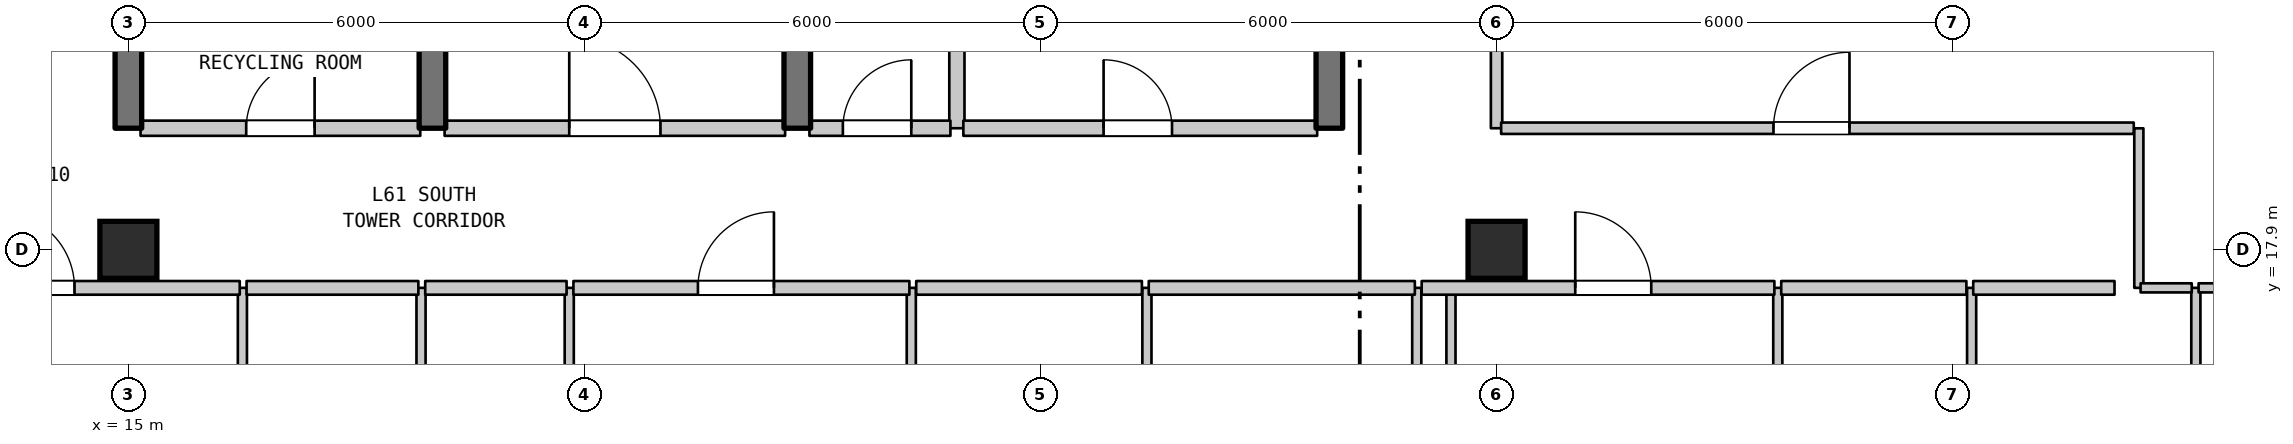
"""IFC4 building model, lengths in metres.
Left out: names, types, materials, properties, quantities, classifications, styles, units other than length and angle.
Written with IfcOpenShell. Run it as: python <this file> out.ifc"""

import sys

from ifc_helpers import new_model, si_unit, direction, frame, frame_2d, origin, origin_2d, place, context, subcontext, project, spatial, rectangle, extrude, element, fill, save


model = new_model("IFC4")
c1 = context("Model", 3, precision=1e-05, world=origin(), true_north=direction((0.0, 1.0)))
c2 = subcontext(c1, "Body", "Model", "MODEL_VIEW")
j1 = project(units=[si_unit("LENGTHUNIT", "METRE"), si_unit("PLANEANGLEUNIT", "RADIAN")], contexts=[c1])
p1 = place(None, origin())
s1 = spatial("IfcSite", under=j1, at=p1, CompositionType="ELEMENT")
p2 = place(p1, origin())
s2 = spatial("IfcBuilding", under=s1, at=p2, CompositionType="ELEMENT")
p3 = place(p2, frame((0.0, 0.0, 247.3)))
s3 = spatial("IfcBuildingStorey", under=s2, at=p3, CompositionType="ELEMENT", Elevation=247.3)
for number, where, z_axis, x_axis in (
    (1, (15.0, 17.9, 0.0), (0.0, 0.0, 1.0), (1.0, 0.0, 0.0)),
    (2, (33.0, 17.9, 0.0), (0.0, 0.0, 1.0), (1.0, 0.0, 0.0)),
):
    element("IfcColumn", number, at=place(p3, frame(where, z_axis=z_axis, x_axis=x_axis)), inside=s3, PredefinedType="COLUMN", context=c2, shape_type="SweptSolid", body=[
        extrude(rectangle(XDim=0.75, YDim=0.75, at=origin_2d()), origin(), (0.0, 0.0, 1.0), 3.7),
    ])
p4 = place(p3, frame((15.0, 19.5, 0.0), z_axis=(0.0, 0.0, 1.0), x_axis=(0.0, 1.0, 0.0)))
e3 = element("IfcWall", 3, at=p4, inside=s3, PredefinedType="SHEAR", context=c2, shape_type="SweptSolid", body=[
    extrude(rectangle(XDim=3.2, YDim=0.35, at=frame_2d((1.6, 0.0))), origin(), (0.0, 0.0, 1.0), 3.39),
])
p5 = place(p3, frame((16.5, 14.2, 0.0), z_axis=(0.0, 0.0, 1.0), x_axis=(0.0, 1.0, 0.0)))
e4 = element("IfcWall", 4, at=p5, inside=s3, PredefinedType="PARTITIONING", context=c2, shape_type="SweptSolid", body=[
    extrude(rectangle(XDim=3.2, YDim=0.12, at=frame_2d((1.6, 0.0))), origin(), (0.0, 0.0, 1.0), 3.39),
])
p6 = place(p5, frame((1.15, 0.0, 0.0)))
e5 = element("IfcOpeningElement", 5, at=p6, cuts=e4, PredefinedType="OPENING", context=c2, shape_type="SweptSolid", body=[
    extrude(rectangle(XDim=0.9, YDim=2.15, at=frame_2d((0.45, 1.075))), frame((0.0, 0.07, 0.0), z_axis=(0.0, -1.0, 0.0), x_axis=(1.0, 0.0, 0.0)), (0.0, 0.0, 1.0), 0.14),
])
p7 = place(p3, frame((18.85, 14.2, 0.0), z_axis=(0.0, 0.0, 1.0), x_axis=(0.0, 1.0, 0.0)))
e6 = element("IfcWall", 6, at=p7, inside=s3, PredefinedType="PARTITIONING", context=c2, shape_type="SweptSolid", body=[
    extrude(rectangle(XDim=3.2, YDim=0.12, at=frame_2d((1.6, 0.0))), origin(), (0.0, 0.0, 1.0), 3.39),
])
p8 = place(p3, frame((19.0, 19.5, 0.0), z_axis=(0.0, 0.0, 1.0), x_axis=(0.0, 1.0, 0.0)))
e7 = element("IfcWall", 7, at=p8, inside=s3, PredefinedType="SHEAR", context=c2, shape_type="SweptSolid", body=[
    extrude(rectangle(XDim=3.2, YDim=0.35, at=frame_2d((1.6, 0.0))), origin(), (0.0, 0.0, 1.0), 3.39),
])
p9 = place(p3, frame((20.8, 7.075, 0.0), z_axis=(0.0, 0.0, 1.0), x_axis=(0.0, 1.0, 0.0)))
e8 = element("IfcWall", 8, at=p9, inside=s3, PredefinedType="PARTITIONING", context=c2, shape_type="SweptSolid", body=[
    extrude(rectangle(XDim=10.325, YDim=0.12, at=frame_2d((5.163, 0.0))), origin(), (0.0, 0.0, 1.0), 3.39),
])
p10 = place(p3, frame((23.8, 19.5, 0.0), z_axis=(0.0, 0.0, 1.0), x_axis=(0.0, 1.0, 0.0)))
e9 = element("IfcWall", 9, at=p10, inside=s3, PredefinedType="SHEAR", context=c2, shape_type="SweptSolid", body=[
    extrude(rectangle(XDim=6.6, YDim=0.35, at=frame_2d((3.3, 0.0))), origin(), (0.0, 0.0, 1.0), 3.39),
])
p11 = place(p10, frame((4.304, 0.0, 0.0)))
e10 = element("IfcOpeningElement", 10, at=p11, cuts=e9, PredefinedType="OPENING", context=c2, shape_type="SweptSolid", body=[
    extrude(rectangle(XDim=0.9, YDim=2.15, at=frame_2d((0.45, 1.075))), frame((0.0, 0.185, 0.0), z_axis=(0.0, -1.0, 0.0), x_axis=(1.0, 0.0, 0.0)), (0.0, 0.0, 1.0), 0.37),
])
p12 = place(p3, frame((25.3, 13.62, 0.0), z_axis=(0.0, 0.0, 1.0), x_axis=(0.0, 1.0, 0.0)))
e11 = element("IfcWall", 11, at=p12, inside=s3, PredefinedType="PARTITIONING", context=c2, shape_type="SweptSolid", body=[
    extrude(rectangle(XDim=3.78, YDim=0.12, at=frame_2d((1.89, 0.0))), origin(), (0.0, 0.0, 1.0), 3.39),
])
p13 = place(p3, frame((25.9, 19.5, 0.0), z_axis=(0.0, 0.0, 1.0), x_axis=(0.0, 1.0, 0.0)))
e12 = element("IfcWall", 12, at=p13, inside=s3, PredefinedType="STANDARD", context=c2, shape_type="SweptSolid", body=[
    extrude(rectangle(XDim=3.2, YDim=0.2, at=frame_2d((1.6, 0.0))), origin(), (0.0, 0.0, 1.0), 3.39),
])
p14 = place(p3, frame((28.4, 13.62, 0.0), z_axis=(0.0, 0.0, 1.0), x_axis=(0.0, 1.0, 0.0)))
e13 = element("IfcWall", 13, at=p14, inside=s3, PredefinedType="PARTITIONING", context=c2, shape_type="SweptSolid", body=[
    extrude(rectangle(XDim=3.78, YDim=0.12, at=frame_2d((1.89, 0.0))), origin(), (0.0, 0.0, 1.0), 3.39),
])
p15 = place(p3, frame((30.8, 19.5, 0.0), z_axis=(0.0, 0.0, 1.0), x_axis=(0.0, 1.0, 0.0)))
e14 = element("IfcWall", 14, at=p15, inside=s3, PredefinedType="SHEAR", context=c2, shape_type="SweptSolid", body=[
    extrude(rectangle(XDim=3.2, YDim=0.35, at=frame_2d((1.6, 0.0))), origin(), (0.0, 0.0, 1.0), 3.39),
])
p16 = place(p3, frame((31.95, 13.62, 0.0), z_axis=(0.0, 0.0, 1.0), x_axis=(0.0, 1.0, 0.0)))
e15 = element("IfcWall", 15, at=p16, inside=s3, PredefinedType="PARTITIONING", context=c2, shape_type="SweptSolid", body=[
    extrude(rectangle(XDim=3.78, YDim=0.12, at=frame_2d((1.89, 0.0))), origin(), (0.0, 0.0, 1.0), 3.39),
])
p17 = place(p3, frame((32.4, 6.71, 0.0), z_axis=(0.0, 0.0, 1.0), x_axis=(0.0, 1.0, 0.0)))
e16 = element("IfcWall", 16, at=p17, inside=s3, PredefinedType="PARTITIONING", context=c2, shape_type="SweptSolid", body=[
    extrude(rectangle(XDim=10.69, YDim=0.12, at=frame_2d((5.345, 0.0))), origin(), (0.0, 0.0, 1.0), 3.39),
])
p18 = place(p3, frame((33.0, 19.5, 0.0), z_axis=(0.0, 0.0, 1.0), x_axis=(0.0, 1.0, 0.0)))
e17 = element("IfcWall", 17, at=p18, inside=s3, PredefinedType="STANDARD", context=c2, shape_type="SweptSolid", body=[
    extrude(rectangle(XDim=8.4, YDim=0.15, at=frame_2d((4.2, 0.0))), origin(), (0.0, 0.0, 1.0), 3.1),
])
for number, where, z_axis, x_axis in (
    (18, (36.7, 13.62, 0.0), (0.0, 0.0, 1.0), (0.0, 1.0, 0.0)),
    (19, (39.25, 13.62, 0.0), (0.0, 0.0, 1.0), (0.0, 1.0, 0.0)),
):
    element("IfcWall", number, at=place(p3, frame(where, z_axis=z_axis, x_axis=x_axis)), inside=s3, PredefinedType="PARTITIONING", context=c2, shape_type="SweptSolid", body=[
        extrude(rectangle(XDim=3.78, YDim=0.12, at=frame_2d((1.89, 0.0))), origin(), (0.0, 0.0, 1.0), 3.39),
    ])
p19 = place(p3, frame((41.45, 17.4, 0.0), z_axis=(0.0, 0.0, 1.0), x_axis=(0.0, 1.0, 0.0)))
e20 = element("IfcWall", 20, at=p19, inside=s3, PredefinedType="PARTITIONING", context=c2, shape_type="SweptSolid", body=[
    extrude(rectangle(XDim=2.099, YDim=0.12, at=frame_2d((1.05, 0.0))), origin(), (0.0, 0.0, 1.0), 3.39),
])
p20 = place(p3, frame((42.2, 13.62, 0.0), z_axis=(0.0, 0.0, 1.0), x_axis=(0.0, 1.0, 0.0)))
e21 = element("IfcWall", 21, at=p20, inside=s3, PredefinedType="PARTITIONING", context=c2, shape_type="SweptSolid", body=[
    extrude(rectangle(XDim=3.78, YDim=0.12, at=frame_2d((1.89, 0.0))), origin(), (0.0, 0.0, 1.0), 3.39),
])
p21 = place(p3, frame((12.975, 17.4, 0.0), z_axis=(0.0, 0.0, 1.0), x_axis=(1.0, 0.0, 0.0)))
e22 = element("IfcWall", 22, at=p21, inside=s3, PredefinedType="STANDARD", context=c2, shape_type="SweptSolid", body=[
    extrude(rectangle(XDim=3.49, YDim=0.18, at=frame_2d((1.745, 0.0))), origin(), (0.0, 0.0, 1.0), 3.39),
])
p22 = place(p21, frame((0.316, 0.0, 0.0)))
e23 = element("IfcOpeningElement", 23, at=p22, cuts=e22, PredefinedType="OPENING", context=c2, shape_type="SweptSolid", body=[
    extrude(rectangle(XDim=1.0, YDim=2.15, at=frame_2d((0.5, 1.075))), frame((0.0, 0.1, 0.0), z_axis=(0.0, -1.0, 0.0), x_axis=(1.0, 0.0, 0.0)), (0.0, 0.0, 1.0), 0.2),
])
p23 = place(p3, frame((16.555, 17.4, 0.0), z_axis=(0.0, 0.0, 1.0), x_axis=(1.0, 0.0, 0.0)))
e24 = element("IfcWall", 24, at=p23, inside=s3, PredefinedType="STANDARD", context=c2, shape_type="SweptSolid", body=[
    extrude(rectangle(XDim=2.26, YDim=0.18, at=frame_2d((1.13, 0.0))), origin(), (0.0, 0.0, 1.0), 3.39),
])
p24 = place(p3, frame((18.905, 17.4, 0.0), z_axis=(0.0, 0.0, 1.0), x_axis=(1.0, 0.0, 0.0)))
e25 = element("IfcWall", 25, at=p24, inside=s3, PredefinedType="STANDARD", context=c2, shape_type="SweptSolid", body=[
    extrude(rectangle(XDim=1.86, YDim=0.18, at=frame_2d((0.93, 0.0))), origin(), (0.0, 0.0, 1.0), 3.39),
])
p25 = place(p3, frame((20.855, 17.4, 0.0), z_axis=(0.0, 0.0, 1.0), x_axis=(1.0, 0.0, 0.0)))
e26 = element("IfcWall", 26, at=p25, inside=s3, PredefinedType="STANDARD", context=c2, shape_type="SweptSolid", body=[
    extrude(rectangle(XDim=4.42, YDim=0.18, at=frame_2d((2.21, 0.0))), origin(), (0.0, 0.0, 1.0), 3.39),
])
p26 = place(p25, frame((1.638, 0.0, 0.0)))
e27 = element("IfcOpeningElement", 27, at=p26, cuts=e26, PredefinedType="OPENING", context=c2, shape_type="SweptSolid", body=[
    extrude(rectangle(XDim=1.0, YDim=2.15, at=frame_2d((0.5, 1.075))), frame((0.0, 0.1, 0.0), z_axis=(0.0, -1.0, 0.0), x_axis=(1.0, 0.0, 0.0)), (0.0, 0.0, 1.0), 0.2),
])
p27 = place(p3, frame((25.365, 17.4, 0.0), z_axis=(0.0, 0.0, 1.0), x_axis=(1.0, 0.0, 0.0)))
e28 = element("IfcWall", 28, at=p27, inside=s3, PredefinedType="STANDARD", context=c2, shape_type="SweptSolid", body=[
    extrude(rectangle(XDim=2.969, YDim=0.18, at=frame_2d((1.484, 0.0))), origin(), (0.0, 0.0, 1.0), 3.39),
])
p28 = place(p3, frame((28.424, 17.4, 0.0), z_axis=(0.0, 0.0, 1.0), x_axis=(1.0, 0.0, 0.0)))
e29 = element("IfcWall", 29, at=p28, inside=s3, PredefinedType="STANDARD", context=c2, shape_type="SweptSolid", body=[
    extrude(rectangle(XDim=3.501, YDim=0.18, at=frame_2d((1.75, 0.0))), origin(), (0.0, 0.0, 1.0), 3.39),
])
p29 = place(p3, frame((32.015, 17.4, 0.0), z_axis=(0.0, 0.0, 1.0), x_axis=(1.0, 0.0, 0.0)))
e30 = element("IfcWall", 30, at=p29, inside=s3, PredefinedType="STANDARD", context=c2, shape_type="SweptSolid", body=[
    extrude(rectangle(XDim=4.64, YDim=0.18, at=frame_2d((2.32, 0.0))), origin(), (0.0, 0.0, 1.0), 3.39),
])
p30 = place(p29, frame((2.02, 0.0, 0.0)))
e31 = element("IfcOpeningElement", 31, at=p30, cuts=e30, PredefinedType="OPENING", context=c2, shape_type="SweptSolid", body=[
    extrude(rectangle(XDim=1.0, YDim=2.15, at=frame_2d((0.5, 1.075))), frame((0.0, 0.1, 0.0), z_axis=(0.0, -1.0, 0.0), x_axis=(1.0, 0.0, 0.0)), (0.0, 0.0, 1.0), 0.2),
])
p31 = place(p3, frame((36.745, 17.4, 0.0), z_axis=(0.0, 0.0, 1.0), x_axis=(1.0, 0.0, 0.0)))
e32 = element("IfcWall", 32, at=p31, inside=s3, PredefinedType="STANDARD", context=c2, shape_type="SweptSolid", body=[
    extrude(rectangle(XDim=2.436, YDim=0.18, at=frame_2d((1.218, 0.0))), origin(), (0.0, 0.0, 1.0), 3.39),
])
p32 = place(p3, frame((39.271, 17.4, 0.0), z_axis=(0.0, 0.0, 1.0), x_axis=(1.0, 0.0, 0.0)))
e33 = element("IfcWall", 33, at=p32, inside=s3, PredefinedType="STANDARD", context=c2, shape_type="SweptSolid", body=[
    extrude(rectangle(XDim=1.859, YDim=0.18, at=frame_2d((0.929, 0.0))), origin(), (0.0, 0.0, 1.0), 3.39),
])
p33 = place(p3, frame((41.473, 17.4, 0.0), z_axis=(0.0, 0.0, 1.0), x_axis=(1.0, 0.0, 0.0)))
e34 = element("IfcWall", 34, at=p33, inside=s3, PredefinedType="PARTITIONING", context=c2, shape_type="SweptSolid", body=[
    extrude(rectangle(XDim=0.673, YDim=0.12, at=frame_2d((0.336, 0.0))), origin(), (0.0, 0.0, 1.0), 3.39),
])
p34 = place(p3, frame((42.236, 17.4, 0.0), z_axis=(0.0, 0.0, 1.0), x_axis=(1.0, 0.0, 0.0)))
e35 = element("IfcWall", 35, at=p34, inside=s3, PredefinedType="PARTITIONING", context=c2, shape_type="SweptSolid", body=[
    extrude(rectangle(XDim=1.268, YDim=0.12, at=frame_2d((0.634, 0.0))), origin(), (0.0, 0.0, 1.0), 3.39),
])
p35 = place(p3, frame((15.16, 19.5, 0.0), z_axis=(0.0, 0.0, 1.0), x_axis=(1.0, 0.0, 0.0)))
e36 = element("IfcWall", 36, at=p35, inside=s3, PredefinedType="STANDARD", context=c2, shape_type="SweptSolid", body=[
    extrude(rectangle(XDim=3.68, YDim=0.2, at=frame_2d((1.84, 0.0))), origin(), (0.0, 0.0, 1.0), 3.39),
])
p36 = place(p35, frame((1.39, 0.0, 0.0)))
e37 = element("IfcOpeningElement", 37, at=p36, cuts=e36, PredefinedType="OPENING", context=c2, shape_type="SweptSolid", body=[
    extrude(rectangle(XDim=0.9, YDim=2.15, at=frame_2d((0.45, 1.075))), frame((0.0, 0.11, 0.0), z_axis=(0.0, -1.0, 0.0), x_axis=(1.0, 0.0, 0.0)), (0.0, 0.0, 1.0), 0.22),
])
p37 = place(p3, frame((19.16, 19.5, 0.0), z_axis=(0.0, 0.0, 1.0), x_axis=(1.0, 0.0, 0.0)))
e38 = element("IfcWall", 38, at=p37, inside=s3, PredefinedType="STANDARD", context=c2, shape_type="SweptSolid", body=[
    extrude(rectangle(XDim=4.48, YDim=0.2, at=frame_2d((2.24, 0.0))), origin(), (0.0, 0.0, 1.0), 3.39),
])
p38 = place(p37, frame((1.64, 0.0, 0.0)))
e39 = element("IfcOpeningElement", 39, at=p38, cuts=e38, PredefinedType="OPENING", context=c2, shape_type="SweptSolid", body=[
    extrude(rectangle(XDim=1.2, YDim=2.2, at=frame_2d((0.6, 1.1))), frame((0.0, 0.11, 0.0), z_axis=(0.0, -1.0, 0.0), x_axis=(1.0, 0.0, 0.0)), (0.0, 0.0, 1.0), 0.22),
])
p39 = place(p3, frame((23.96, 19.5, 0.0), z_axis=(0.0, 0.0, 1.0), x_axis=(1.0, 0.0, 0.0)))
e40 = element("IfcWall", 40, at=p39, inside=s3, PredefinedType="STANDARD", context=c2, shape_type="SweptSolid", body=[
    extrude(rectangle(XDim=1.855, YDim=0.2, at=frame_2d((0.927, 0.0))), origin(), (0.0, 0.0, 1.0), 3.39),
])
p40 = place(p39, frame((0.44, 0.0, 0.0)))
e41 = element("IfcOpeningElement", 41, at=p40, cuts=e40, PredefinedType="OPENING", context=c2, shape_type="SweptSolid", body=[
    extrude(rectangle(XDim=0.9, YDim=2.15, at=frame_2d((0.45, 1.075))), frame((0.0, 0.11, 0.0), z_axis=(0.0, -1.0, 0.0), x_axis=(1.0, 0.0, 0.0)), (0.0, 0.0, 1.0), 0.22),
])
p41 = place(p3, frame((25.985, 19.5, 0.0), z_axis=(0.0, 0.0, 1.0), x_axis=(1.0, 0.0, 0.0)))
e42 = element("IfcWall", 42, at=p41, inside=s3, PredefinedType="STANDARD", context=c2, shape_type="SweptSolid", body=[
    extrude(rectangle(XDim=4.655, YDim=0.2, at=frame_2d((2.327, 0.0))), origin(), (0.0, 0.0, 1.0), 3.39),
])
p42 = place(p41, frame((1.845, 0.0, 0.0)))
e43 = element("IfcOpeningElement", 43, at=p42, cuts=e42, PredefinedType="OPENING", context=c2, shape_type="SweptSolid", body=[
    extrude(rectangle(XDim=0.9, YDim=2.15, at=frame_2d((0.45, 1.075))), frame((0.0, 0.11, 0.0), z_axis=(0.0, -1.0, 0.0), x_axis=(1.0, 0.0, 0.0)), (0.0, 0.0, 1.0), 0.22),
])
p43 = place(p3, frame((33.06, 19.5, 0.0), z_axis=(0.0, 0.0, 1.0), x_axis=(1.0, 0.0, 0.0)))
e44 = element("IfcWall", 44, at=p43, inside=s3, PredefinedType="STANDARD", context=c2, shape_type="SweptSolid", body=[
    extrude(rectangle(XDim=8.323, YDim=0.15, at=frame_2d((4.162, 0.0))), origin(), (0.0, 0.0, 1.0), 3.39),
])
p44 = place(p43, frame((3.583, 0.0, 0.0)))
e45 = element("IfcOpeningElement", 45, at=p44, cuts=e44, PredefinedType="OPENING", context=c2, shape_type="SweptSolid", body=[
    extrude(rectangle(XDim=1.0, YDim=2.15, at=frame_2d((0.5, 1.075))), frame((0.0, 0.085, 0.0), z_axis=(0.0, -1.0, 0.0), x_axis=(1.0, 0.0, 0.0)), (0.0, 0.0, 1.0), 0.17),
])
p45 = place(p22, origin())
e46 = element("IfcDoor", 46, at=p45, inside=s3, OperationType="SINGLE_SWING_LEFT", PredefinedType="DOOR", context=c2, shape_type="SweptSolid", body=[
    extrude(rectangle(XDim=1.0, YDim=2.15, at=frame_2d((0.5, 1.075))), frame((0.0, 0.025, 0.0), z_axis=(0.0, -1.0, 0.0), x_axis=(1.0, 0.0, 0.0)), (0.0, 0.0, 1.0), 0.05),
])
fill(e23, e46)
p46 = place(p26, origin())
e47 = element("IfcDoor", 47, at=p46, inside=s3, OperationType="SINGLE_SWING_RIGHT", PredefinedType="DOOR", context=c2, shape_type="SweptSolid", body=[
    extrude(rectangle(XDim=1.0, YDim=2.15, at=frame_2d((0.5, 1.075))), frame((0.0, 0.025, 0.0), z_axis=(0.0, -1.0, 0.0), x_axis=(1.0, 0.0, 0.0)), (0.0, 0.0, 1.0), 0.05),
])
fill(e27, e47)
p47 = place(p30, origin())
e48 = element("IfcDoor", 48, at=p47, inside=s3, OperationType="SINGLE_SWING_LEFT", PredefinedType="DOOR", context=c2, shape_type="SweptSolid", body=[
    extrude(rectangle(XDim=1.0, YDim=2.15, at=frame_2d((0.5, 1.075))), frame((0.0, 0.025, 0.0), z_axis=(0.0, -1.0, 0.0), x_axis=(1.0, 0.0, 0.0)), (0.0, 0.0, 1.0), 0.05),
])
fill(e31, e48)
p48 = place(p36, origin())
e49 = element("IfcDoor", 49, at=p48, inside=s3, OperationType="SINGLE_SWING_RIGHT", PredefinedType="DOOR", context=c2, shape_type="SweptSolid", body=[
    extrude(rectangle(XDim=0.9, YDim=2.15, at=frame_2d((0.45, 1.075))), frame((0.0, 0.025, 0.0), z_axis=(0.0, -1.0, 0.0), x_axis=(1.0, 0.0, 0.0)), (0.0, 0.0, 1.0), 0.05),
])
fill(e37, e49)
p49 = place(p38, origin())
e50 = element("IfcDoor", 50, at=p49, inside=s3, OperationType="SINGLE_SWING_LEFT", PredefinedType="DOOR", context=c2, shape_type="SweptSolid", body=[
    extrude(rectangle(XDim=1.2, YDim=2.2, at=frame_2d((0.6, 1.1))), frame((0.0, 0.025, 0.0), z_axis=(0.0, -1.0, 0.0), x_axis=(1.0, 0.0, 0.0)), (0.0, 0.0, 1.0), 0.05),
])
fill(e39, e50)
p50 = place(p40, origin())
e51 = element("IfcDoor", 51, at=p50, inside=s3, OperationType="SINGLE_SWING_RIGHT", PredefinedType="DOOR", context=c2, shape_type="SweptSolid", body=[
    extrude(rectangle(XDim=0.9, YDim=2.15, at=frame_2d((0.45, 1.075))), frame((0.0, 0.025, 0.0), z_axis=(0.0, -1.0, 0.0), x_axis=(1.0, 0.0, 0.0)), (0.0, 0.0, 1.0), 0.05),
])
fill(e41, e51)
p51 = place(p42, origin())
e52 = element("IfcDoor", 52, at=p51, inside=s3, OperationType="SINGLE_SWING_LEFT", PredefinedType="DOOR", context=c2, shape_type="SweptSolid", body=[
    extrude(rectangle(XDim=0.9, YDim=2.15, at=frame_2d((0.45, 1.075))), frame((0.0, 0.025, 0.0), z_axis=(0.0, -1.0, 0.0), x_axis=(1.0, 0.0, 0.0)), (0.0, 0.0, 1.0), 0.05),
])
fill(e43, e52)
p52 = place(p44, origin())
e53 = element("IfcDoor", 53, at=p52, inside=s3, OperationType="SINGLE_SWING_RIGHT", PredefinedType="DOOR", context=c2, shape_type="SweptSolid", body=[
    extrude(rectangle(XDim=1.0, YDim=2.15, at=frame_2d((0.5, 1.075))), frame((0.0, 0.025, 0.0), z_axis=(0.0, -1.0, 0.0), x_axis=(1.0, 0.0, 0.0)), (0.0, 0.0, 1.0), 0.05),
])
fill(e45, e53)
save(model, sys.argv[1])
